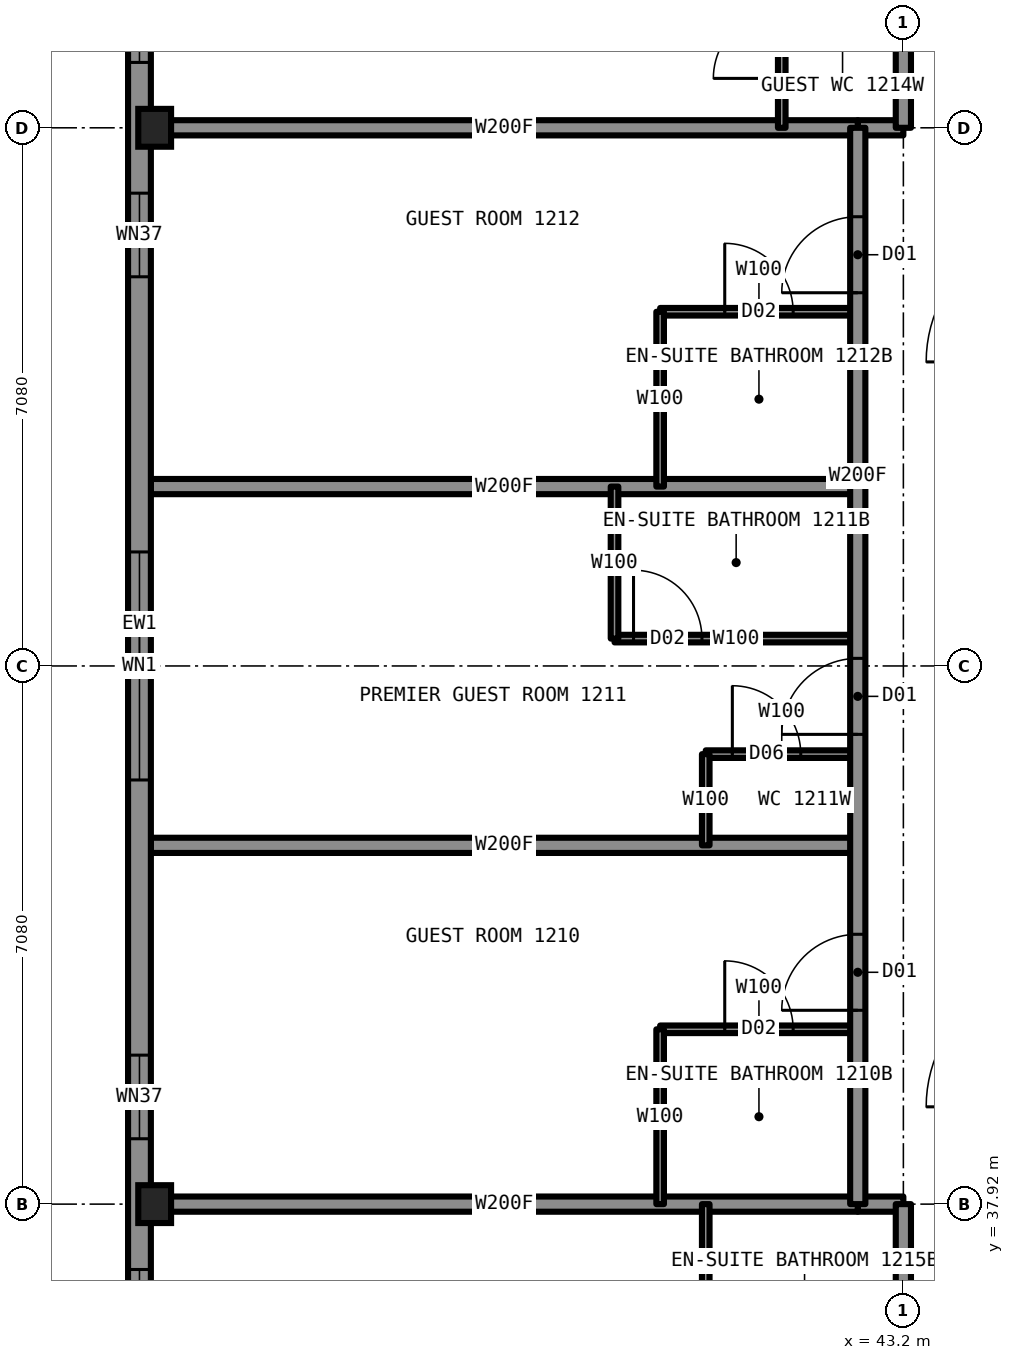
"""IFC4 building model, lengths in metres.
Left out: names, types, materials, properties, quantities, classifications, styles, units other than length and angle.
Written with IfcOpenShell. Run it as: python <this file> out.ifc"""

import sys

from ifc_helpers import new_model, si_unit, direction, frame, frame_2d, origin, origin_2d, place, context, subcontext, project, spatial, rectangle, i_section, extrude, element, fill, save


model = new_model("IFC4")
c1 = context("Model", 3, precision=1e-05, world=origin(), true_north=direction((0.0, 1.0)))
c2 = subcontext(c1, "Body", "Model", "MODEL_VIEW")
j1 = project(units=[si_unit("LENGTHUNIT", "METRE"), si_unit("PLANEANGLEUNIT", "RADIAN")], contexts=[c1])
p1 = place(None, origin())
s1 = spatial("IfcSite", under=j1, at=p1, CompositionType="ELEMENT")
p2 = place(p1, origin())
s2 = spatial("IfcBuilding", under=s1, at=p2, CompositionType="ELEMENT")
p3 = place(p2, frame((0.0, 0.0, 49.5)))
s3 = spatial("IfcBuildingStorey", under=s2, at=p3, CompositionType="ELEMENT", Elevation=49.5)
for number, where, z_axis, x_axis in (
    (1, (33.35, 37.92, 0.0), (0.0, 0.0, 1.0), (1.0, 0.0, 0.0)),
    (2, (33.35, 52.08, 0.0), (0.0, 0.0, 1.0), (1.0, 0.0, 0.0)),
):
    element("IfcColumn", number, at=place(p3, frame(where, z_axis=z_axis, x_axis=x_axis)), inside=s3, PredefinedType="COLUMN", context=c2, shape_type="SweptSolid", body=[
        extrude(i_section(OverallWidth=0.432, OverallDepth=0.498, WebThickness=0.056, FlangeThickness=0.089, at=origin_2d()), origin(), (0.0, 0.0, 1.0), 3.5),
    ])
p4 = place(p3, frame((40.6, 43.84, 0.0), z_axis=(0.0, 0.0, 1.0), x_axis=(1.0, 0.0, 0.0)))
e3 = element("IfcWall", 3, at=p4, inside=s3, PredefinedType="PARTITIONING", context=c2, shape_type="SweptSolid", body=[
    extrude(rectangle(XDim=2.0, YDim=0.1, at=frame_2d((1.0, 0.0))), origin(), (0.0, 0.0, 1.0), 3.33),
])
p5 = place(p4, frame((0.35, 0.0, 0.0)))
e4 = element("IfcOpeningElement", 4, at=p5, cuts=e3, PredefinedType="OPENING", context=c2, shape_type="SweptSolid", body=[
    extrude(rectangle(XDim=0.9, YDim=2.1, at=frame_2d((0.45, 1.05))), frame((0.0, 0.06, 0.0), z_axis=(0.0, -1.0, 0.0), x_axis=(1.0, 0.0, 0.0)), (0.0, 0.0, 1.0), 0.12),
])
p6 = place(p3, frame((33.3, 42.64, 0.0), z_axis=(0.0, 0.0, 1.0), x_axis=(1.0, 0.0, 0.0)))
e5 = element("IfcWall", 5, at=p6, inside=s3, PredefinedType="PARTITIONING", context=c2, shape_type="SweptSolid", body=[
    extrude(rectangle(XDim=9.3, YDim=0.2, at=frame_2d((4.65, 0.0))), origin(), (0.0, 0.0, 1.0), 2.723),
])
p7 = place(p3, frame((40.0, 40.22, 0.0), z_axis=(0.0, 0.0, 1.0), x_axis=(1.0, 0.0, 0.0)))
e6 = element("IfcWall", 6, at=p7, inside=s3, PredefinedType="PARTITIONING", context=c2, shape_type="SweptSolid", body=[
    extrude(rectangle(XDim=2.6, YDim=0.1, at=frame_2d((1.3, 0.0))), origin(), (0.0, 0.0, 1.0), 2.723),
])
p8 = place(p7, frame((0.85, 0.0, 0.0)))
e7 = element("IfcOpeningElement", 7, at=p8, cuts=e6, PredefinedType="OPENING", context=c2, shape_type="SweptSolid", body=[
    extrude(rectangle(XDim=0.9, YDim=2.1, at=frame_2d((0.45, 1.05))), frame((0.0, 0.06, 0.0), z_axis=(0.0, -1.0, 0.0), x_axis=(1.0, 0.0, 0.0)), (0.0, 0.0, 1.0), 0.12),
])
p9 = place(p3, frame((42.6, 37.92, 0.0), z_axis=(0.0, 0.0, 1.0), x_axis=(1.0, 0.0, 0.0)))
e8 = element("IfcWall", 8, at=p9, inside=s3, PredefinedType="PARTITIONING", context=c2, shape_type="SweptSolid", body=[
    extrude(rectangle(XDim=0.6, YDim=0.2, at=frame_2d((0.3, 0.0))), origin(), (0.0, 0.0, 1.0), 2.573),
])
p10 = place(p3, frame((33.3, 37.92, 0.0), z_axis=(0.0, 0.0, 1.0), x_axis=(1.0, 0.0, 0.0)))
e9 = element("IfcWall", 9, at=p10, inside=s3, PredefinedType="PARTITIONING", context=c2, shape_type="SweptSolid", body=[
    extrude(rectangle(XDim=9.3, YDim=0.2, at=frame_2d((4.65, 0.0))), origin(), (0.0, 0.0, 1.0), 2.573),
])
p11 = place(p3, frame((39.4, 45.36, 0.0), z_axis=(0.0, 0.0, 1.0), x_axis=(1.0, 0.0, 0.0)))
e10 = element("IfcWall", 10, at=p11, inside=s3, PredefinedType="PARTITIONING", context=c2, shape_type="SweptSolid", body=[
    extrude(rectangle(XDim=3.2, YDim=0.1, at=frame_2d((1.6, 0.0))), origin(), (0.0, 0.0, 1.0), 3.33),
])
p12 = place(p11, frame((0.25, 0.0, 0.0)))
e11 = element("IfcOpeningElement", 11, at=p12, cuts=e10, PredefinedType="OPENING", context=c2, shape_type="SweptSolid", body=[
    extrude(rectangle(XDim=0.9, YDim=2.1, at=frame_2d((0.45, 1.05))), frame((0.0, 0.06, 0.0), z_axis=(0.0, -1.0, 0.0), x_axis=(1.0, 0.0, 0.0)), (0.0, 0.0, 1.0), 0.12),
])
p13 = place(p3, frame((33.3, 47.36, 0.0), z_axis=(0.0, 0.0, 1.0), x_axis=(1.0, 0.0, 0.0)))
e12 = element("IfcWall", 12, at=p13, inside=s3, PredefinedType="PARTITIONING", context=c2, shape_type="SweptSolid", body=[
    extrude(rectangle(XDim=9.3, YDim=0.2, at=frame_2d((4.65, 0.0))), origin(), (0.0, 0.0, 1.0), 2.723),
])
p14 = place(p3, frame((40.0, 49.66, 0.0), z_axis=(0.0, 0.0, 1.0), x_axis=(1.0, 0.0, 0.0)))
e13 = element("IfcWall", 13, at=p14, inside=s3, PredefinedType="PARTITIONING", context=c2, shape_type="SweptSolid", body=[
    extrude(rectangle(XDim=2.6, YDim=0.1, at=frame_2d((1.3, 0.0))), origin(), (0.0, 0.0, 1.0), 2.723),
])
p15 = place(p14, frame((0.85, 0.0, 0.0)))
e14 = element("IfcOpeningElement", 14, at=p15, cuts=e13, PredefinedType="OPENING", context=c2, shape_type="SweptSolid", body=[
    extrude(rectangle(XDim=0.9, YDim=2.1, at=frame_2d((0.45, 1.05))), frame((0.0, 0.06, 0.0), z_axis=(0.0, -1.0, 0.0), x_axis=(1.0, 0.0, 0.0)), (0.0, 0.0, 1.0), 0.12),
])
p16 = place(p3, frame((42.6, 52.08, 0.0), z_axis=(0.0, 0.0, 1.0), x_axis=(1.0, 0.0, 0.0)))
e15 = element("IfcWall", 15, at=p16, inside=s3, PredefinedType="PARTITIONING", context=c2, shape_type="SweptSolid", body=[
    extrude(rectangle(XDim=0.6, YDim=0.2, at=frame_2d((0.3, 0.0))), origin(), (0.0, 0.0, 1.0), 2.573),
])
p17 = place(p3, frame((33.3, 52.08, 0.0), z_axis=(0.0, 0.0, 1.0), x_axis=(1.0, 0.0, 0.0)))
e16 = element("IfcWall", 16, at=p17, inside=s3, PredefinedType="PARTITIONING", context=c2, shape_type="SweptSolid", body=[
    extrude(rectangle(XDim=9.3, YDim=0.2, at=frame_2d((4.65, 0.0))), origin(), (0.0, 0.0, 1.0), 2.573),
])
p18 = place(p3, frame((43.2, 33.2, 0.0), z_axis=(0.0, 0.0, 1.0), x_axis=(0.0, 1.0, 0.0)))
e17 = element("IfcWall", 17, at=p18, inside=s3, PredefinedType="PARTITIONING", context=c2, shape_type="SweptSolid", body=[
    extrude(rectangle(XDim=4.72, YDim=0.2, at=frame_2d((2.36, 0.0))), origin(), (0.0, 0.0, 1.0), 3.33),
])
p19 = place(p18, frame((0.66, 0.0, 0.0)))
e18 = element("IfcOpeningElement", 18, at=p19, cuts=e17, PredefinedType="OPENING", context=c2, shape_type="SweptSolid", body=[
    extrude(rectangle(XDim=1.1, YDim=2.2, at=frame_2d((0.55, 1.1))), frame((0.0, 0.11, 0.0), z_axis=(0.0, -1.0, 0.0), x_axis=(1.0, 0.0, 0.0)), (0.0, 0.0, 1.0), 0.22),
])
p20 = place(p3, frame((43.2, 52.08, 0.0), z_axis=(0.0, 0.0, 1.0), x_axis=(0.0, 1.0, 0.0)))
e19 = element("IfcWall", 19, at=p20, inside=s3, PredefinedType="PARTITIONING", context=c2, shape_type="SweptSolid", body=[
    extrude(rectangle(XDim=4.72, YDim=0.2, at=frame_2d((2.36, 0.0))), origin(), (0.0, 0.0, 1.0), 3.33),
])
p21 = place(p20, frame((2.97, 0.0, 0.0)))
e20 = element("IfcOpeningElement", 20, at=p21, cuts=e19, PredefinedType="OPENING", context=c2, shape_type="SweptSolid", body=[
    extrude(rectangle(XDim=1.1, YDim=2.2, at=frame_2d((0.55, 1.1))), frame((0.0, 0.11, 0.0), z_axis=(0.0, -1.0, 0.0), x_axis=(1.0, 0.0, 0.0)), (0.0, 0.0, 1.0), 0.22),
])
p22 = place(p3, frame((42.6, 37.92, 0.0), z_axis=(0.0, 0.0, 1.0), x_axis=(0.0, 1.0, 0.0)))
e21 = element("IfcWall", 21, at=p22, inside=s3, PredefinedType="PARTITIONING", context=c2, shape_type="SweptSolid", body=[
    extrude(rectangle(XDim=14.16, YDim=0.2, at=frame_2d((7.08, 0.0))), origin(), (0.0, 0.0, 1.0), 3.33),
])
p23 = place(p22, frame((2.55, 0.0, 0.0)))
e22 = element("IfcOpeningElement", 22, at=p23, cuts=e21, PredefinedType="OPENING", context=c2, shape_type="SweptSolid", body=[
    extrude(rectangle(XDim=1.0, YDim=2.2, at=frame_2d((0.5, 1.1))), frame((0.0, 0.11, 0.0), z_axis=(0.0, -1.0, 0.0), x_axis=(1.0, 0.0, 0.0)), (0.0, 0.0, 1.0), 0.22),
])
p24 = place(p22, frame((6.18, 0.0, 0.0)))
e23 = element("IfcOpeningElement", 23, at=p24, cuts=e21, PredefinedType="OPENING", context=c2, shape_type="SweptSolid", body=[
    extrude(rectangle(XDim=1.0, YDim=2.2, at=frame_2d((0.5, 1.1))), frame((0.0, 0.11, 0.0), z_axis=(0.0, -1.0, 0.0), x_axis=(1.0, 0.0, 0.0)), (0.0, 0.0, 1.0), 0.22),
])
p25 = place(p22, frame((11.99, 0.0, 0.0)))
e24 = element("IfcOpeningElement", 24, at=p25, cuts=e21, PredefinedType="OPENING", context=c2, shape_type="SweptSolid", body=[
    extrude(rectangle(XDim=1.0, YDim=2.2, at=frame_2d((0.5, 1.1))), frame((0.0, 0.11, 0.0), z_axis=(0.0, -1.0, 0.0), x_axis=(1.0, 0.0, 0.0)), (0.0, 0.0, 1.0), 0.22),
])
p26 = place(p3, frame((41.6, 52.08, 0.0), z_axis=(0.0, 0.0, 1.0), x_axis=(0.0, 1.0, 0.0)))
e25 = element("IfcWall", 25, at=p26, inside=s3, PredefinedType="PARTITIONING", context=c2, shape_type="SweptSolid", body=[
    extrude(rectangle(XDim=2.2, YDim=0.1, at=frame_2d((1.1, 0.0))), origin(), (0.0, 0.0, 1.0), 3.33),
])
p27 = place(p26, frame((0.65, 0.0, 0.0)))
e26 = element("IfcOpeningElement", 26, at=p27, cuts=e25, PredefinedType="OPENING", context=c2, shape_type="SweptSolid", body=[
    extrude(rectangle(XDim=0.9, YDim=2.1, at=frame_2d((0.45, 1.05))), frame((0.0, 0.06, 0.0), z_axis=(0.0, -1.0, 0.0), x_axis=(1.0, 0.0, 0.0)), (0.0, 0.0, 1.0), 0.12),
])
p28 = place(p3, frame((40.6, 35.32, 0.0), z_axis=(0.0, 0.0, 1.0), x_axis=(0.0, 1.0, 0.0)))
e27 = element("IfcWall", 27, at=p28, inside=s3, PredefinedType="PARTITIONING", context=c2, shape_type="SweptSolid", body=[
    extrude(rectangle(XDim=2.6, YDim=0.1, at=frame_2d((1.3, 0.0))), origin(), (0.0, 0.0, 1.0), 3.33),
])
p29 = place(p3, frame((40.6, 42.64, 0.0), z_axis=(0.0, 0.0, 1.0), x_axis=(0.0, 1.0, 0.0)))
e28 = element("IfcWall", 28, at=p29, inside=s3, PredefinedType="PARTITIONING", context=c2, shape_type="SweptSolid", body=[
    extrude(rectangle(XDim=1.2, YDim=0.1, at=frame_2d((0.6, 0.0))), origin(), (0.0, 0.0, 1.0), 3.33),
])
p30 = place(p3, frame((40.0, 37.92, 0.0), z_axis=(0.0, 0.0, 1.0), x_axis=(0.0, 1.0, 0.0)))
e29 = element("IfcWall", 29, at=p30, inside=s3, PredefinedType="PARTITIONING", context=c2, shape_type="SweptSolid", body=[
    extrude(rectangle(XDim=2.3, YDim=0.1, at=frame_2d((1.15, 0.0))), origin(), (0.0, 0.0, 1.0), 3.33),
])
p31 = place(p3, frame((40.0, 47.36, 0.0), z_axis=(0.0, 0.0, 1.0), x_axis=(0.0, 1.0, 0.0)))
e30 = element("IfcWall", 30, at=p31, inside=s3, PredefinedType="PARTITIONING", context=c2, shape_type="SweptSolid", body=[
    extrude(rectangle(XDim=2.3, YDim=0.1, at=frame_2d((1.15, 0.0))), origin(), (0.0, 0.0, 1.0), 3.33),
])
p32 = place(p3, frame((39.4, 45.36, 0.0), z_axis=(0.0, 0.0, 1.0), x_axis=(0.0, 1.0, 0.0)))
e31 = element("IfcWall", 31, at=p32, inside=s3, PredefinedType="PARTITIONING", context=c2, shape_type="SweptSolid", body=[
    extrude(rectangle(XDim=2.0, YDim=0.1, at=frame_2d((1.0, 0.0))), origin(), (0.0, 0.0, 1.0), 3.33),
])
p33 = place(p3, frame((33.15, 61.5, 0.0), z_axis=(0.0, 0.0, 1.0), x_axis=(0.0, -1.0, 0.0)))
e32 = element("IfcWall", 32, at=p33, inside=s3, PredefinedType="SOLIDWALL", context=c2, shape_type="SweptSolid", body=[
    extrude(rectangle(XDim=33.0, YDim=0.3, at=frame_2d((16.5, 0.0))), origin(), (0.0, 0.0, 1.0), 2.83),
])
p34 = place(p33, frame((0.85, 0.0, 0.5)))
e33 = element("IfcOpeningElement", 33, at=p34, cuts=e32, PredefinedType="OPENING", context=c2, shape_type="SweptSolid", body=[
    extrude(rectangle(XDim=3.0, YDim=2.0, at=frame_2d((1.5, 1.0))), frame((0.0, 0.16, 0.0), z_axis=(0.0, -1.0, 0.0), x_axis=(1.0, 0.0, 0.0)), (0.0, 0.0, 1.0), 0.32),
])
p35 = place(p33, frame((5.56, 0.0, 0.5)))
e34 = element("IfcOpeningElement", 34, at=p35, cuts=e32, PredefinedType="OPENING", context=c2, shape_type="SweptSolid", body=[
    extrude(rectangle(XDim=3.0, YDim=2.0, at=frame_2d((1.5, 1.0))), frame((0.0, 0.16, 0.0), z_axis=(0.0, -1.0, 0.0), x_axis=(1.0, 0.0, 0.0)), (0.0, 0.0, 1.0), 0.32),
])
p36 = place(p33, frame((10.28, 0.0, 1.1)))
e35 = element("IfcOpeningElement", 35, at=p36, cuts=e32, PredefinedType="OPENING", context=c2, shape_type="SweptSolid", body=[
    extrude(rectangle(XDim=1.1, YDim=1.4, at=frame_2d((0.55, 0.7))), frame((0.0, 0.16, 0.0), z_axis=(0.0, -1.0, 0.0), x_axis=(1.0, 0.0, 0.0)), (0.0, 0.0, 1.0), 0.32),
])
p37 = place(p33, frame((15.0, 0.0, 0.5)))
e36 = element("IfcOpeningElement", 36, at=p37, cuts=e32, PredefinedType="OPENING", context=c2, shape_type="SweptSolid", body=[
    extrude(rectangle(XDim=3.0, YDim=2.0, at=frame_2d((1.5, 1.0))), frame((0.0, 0.16, 0.0), z_axis=(0.0, -1.0, 0.0), x_axis=(1.0, 0.0, 0.0)), (0.0, 0.0, 1.0), 0.32),
])
p38 = place(p33, frame((21.62, 0.0, 1.1)))
e37 = element("IfcOpeningElement", 37, at=p38, cuts=e32, PredefinedType="OPENING", context=c2, shape_type="SweptSolid", body=[
    extrude(rectangle(XDim=1.1, YDim=1.4, at=frame_2d((0.55, 0.7))), frame((0.0, 0.16, 0.0), z_axis=(0.0, -1.0, 0.0), x_axis=(1.0, 0.0, 0.0)), (0.0, 0.0, 1.0), 0.32),
])
p39 = place(p33, frame((24.44, 0.0, 0.5)))
e38 = element("IfcOpeningElement", 38, at=p39, cuts=e32, PredefinedType="OPENING", context=c2, shape_type="SweptSolid", body=[
    extrude(rectangle(XDim=3.0, YDim=2.0, at=frame_2d((1.5, 1.0))), frame((0.0, 0.16, 0.0), z_axis=(0.0, -1.0, 0.0), x_axis=(1.0, 0.0, 0.0)), (0.0, 0.0, 1.0), 0.32),
])
p40 = place(p33, frame((29.15, 0.0, 0.5)))
e39 = element("IfcOpeningElement", 39, at=p40, cuts=e32, PredefinedType="OPENING", context=c2, shape_type="SweptSolid", body=[
    extrude(rectangle(XDim=3.0, YDim=2.0, at=frame_2d((1.5, 1.0))), frame((0.0, 0.16, 0.0), z_axis=(0.0, -1.0, 0.0), x_axis=(1.0, 0.0, 0.0)), (0.0, 0.0, 1.0), 0.32),
])
p41 = place(p23, origin())
e40 = element("IfcDoor", 40, at=p41, inside=s3, OperationType="SINGLE_SWING_LEFT", PredefinedType="DOOR", context=c2, shape_type="SweptSolid", body=[
    extrude(rectangle(XDim=1.0, YDim=2.2, at=frame_2d((0.5, 1.1))), frame((0.0, 0.025, 0.0), z_axis=(0.0, -1.0, 0.0), x_axis=(1.0, 0.0, 0.0)), (0.0, 0.0, 1.0), 0.05),
])
fill(e22, e40)
p42 = place(p8, origin())
e41 = element("IfcDoor", 41, at=p42, inside=s3, OperationType="SINGLE_SWING_RIGHT", PredefinedType="DOOR", context=c2, shape_type="SweptSolid", body=[
    extrude(rectangle(XDim=0.9, YDim=2.1, at=frame_2d((0.45, 1.05))), frame((0.0, 0.025, 0.0), z_axis=(0.0, -1.0, 0.0), x_axis=(1.0, 0.0, 0.0)), (0.0, 0.0, 1.0), 0.05),
])
fill(e7, e41)
p43 = place(p24, origin())
e42 = element("IfcDoor", 42, at=p43, inside=s3, OperationType="SINGLE_SWING_LEFT", PredefinedType="DOOR", context=c2, shape_type="SweptSolid", body=[
    extrude(rectangle(XDim=1.0, YDim=2.2, at=frame_2d((0.5, 1.1))), frame((0.0, 0.025, 0.0), z_axis=(0.0, -1.0, 0.0), x_axis=(1.0, 0.0, 0.0)), (0.0, 0.0, 1.0), 0.05),
])
fill(e23, e42)
p44 = place(p12, origin())
e43 = element("IfcDoor", 43, at=p44, inside=s3, OperationType="SINGLE_SWING_RIGHT", PredefinedType="DOOR", context=c2, shape_type="SweptSolid", body=[
    extrude(rectangle(XDim=0.9, YDim=2.1, at=frame_2d((0.45, 1.05))), frame((0.0, 0.025, 0.0), z_axis=(0.0, -1.0, 0.0), x_axis=(1.0, 0.0, 0.0)), (0.0, 0.0, 1.0), 0.05),
])
fill(e11, e43)
p45 = place(p5, origin())
e44 = element("IfcDoor", 44, at=p45, inside=s3, OperationType="SINGLE_SWING_LEFT", PredefinedType="DOOR", context=c2, shape_type="SweptSolid", body=[
    extrude(rectangle(XDim=0.9, YDim=2.1, at=frame_2d((0.45, 1.05))), frame((0.0, 0.025, 0.0), z_axis=(0.0, -1.0, 0.0), x_axis=(1.0, 0.0, 0.0)), (0.0, 0.0, 1.0), 0.05),
])
fill(e4, e44)
p46 = place(p25, origin())
e45 = element("IfcDoor", 45, at=p46, inside=s3, OperationType="SINGLE_SWING_LEFT", PredefinedType="DOOR", context=c2, shape_type="SweptSolid", body=[
    extrude(rectangle(XDim=1.0, YDim=2.2, at=frame_2d((0.5, 1.1))), frame((0.0, 0.025, 0.0), z_axis=(0.0, -1.0, 0.0), x_axis=(1.0, 0.0, 0.0)), (0.0, 0.0, 1.0), 0.05),
])
fill(e24, e45)
p47 = place(p15, origin())
e46 = element("IfcDoor", 46, at=p47, inside=s3, OperationType="SINGLE_SWING_RIGHT", PredefinedType="DOOR", context=c2, shape_type="SweptSolid", body=[
    extrude(rectangle(XDim=0.9, YDim=2.1, at=frame_2d((0.45, 1.05))), frame((0.0, 0.025, 0.0), z_axis=(0.0, -1.0, 0.0), x_axis=(1.0, 0.0, 0.0)), (0.0, 0.0, 1.0), 0.05),
])
fill(e14, e46)
p48 = place(p27, origin())
e47 = element("IfcDoor", 47, at=p48, inside=s3, OperationType="SINGLE_SWING_LEFT", PredefinedType="DOOR", context=c2, shape_type="SweptSolid", body=[
    extrude(rectangle(XDim=0.9, YDim=2.1, at=frame_2d((0.45, 1.05))), frame((0.0, 0.025, 0.0), z_axis=(0.0, -1.0, 0.0), x_axis=(1.0, 0.0, 0.0)), (0.0, 0.0, 1.0), 0.05),
])
fill(e26, e47)
p49 = place(p35, origin())
e48 = element("IfcWindow", 48, at=p49, inside=s3, PartitioningType="SINGLE_PANEL", PredefinedType="WINDOW", context=c2, shape_type="SweptSolid", body=[
    extrude(rectangle(XDim=3.0, YDim=2.0, at=frame_2d((1.5, 1.0))), frame((0.0, 0.03, 0.0), z_axis=(0.0, -1.0, 0.0), x_axis=(1.0, 0.0, 0.0)), (0.0, 0.0, 1.0), 0.06),
])
fill(e34, e48)
p50 = place(p36, origin())
e49 = element("IfcWindow", 49, at=p50, inside=s3, PartitioningType="SINGLE_PANEL", PredefinedType="WINDOW", context=c2, shape_type="SweptSolid", body=[
    extrude(rectangle(XDim=1.1, YDim=1.4, at=frame_2d((0.55, 0.7))), frame((0.0, 0.03, 0.0), z_axis=(0.0, -1.0, 0.0), x_axis=(1.0, 0.0, 0.0)), (0.0, 0.0, 1.0), 0.06),
])
fill(e35, e49)
p51 = place(p37, origin())
e50 = element("IfcWindow", 50, at=p51, inside=s3, PartitioningType="SINGLE_PANEL", PredefinedType="WINDOW", context=c2, shape_type="SweptSolid", body=[
    extrude(rectangle(XDim=3.0, YDim=2.0, at=frame_2d((1.5, 1.0))), frame((0.0, 0.03, 0.0), z_axis=(0.0, -1.0, 0.0), x_axis=(1.0, 0.0, 0.0)), (0.0, 0.0, 1.0), 0.06),
])
fill(e36, e50)
p52 = place(p38, origin())
e51 = element("IfcWindow", 51, at=p52, inside=s3, PartitioningType="SINGLE_PANEL", PredefinedType="WINDOW", context=c2, shape_type="SweptSolid", body=[
    extrude(rectangle(XDim=1.1, YDim=1.4, at=frame_2d((0.55, 0.7))), frame((0.0, 0.03, 0.0), z_axis=(0.0, -1.0, 0.0), x_axis=(1.0, 0.0, 0.0)), (0.0, 0.0, 1.0), 0.06),
])
fill(e37, e51)
p53 = place(p39, origin())
e52 = element("IfcWindow", 52, at=p53, inside=s3, PartitioningType="SINGLE_PANEL", PredefinedType="WINDOW", context=c2, shape_type="SweptSolid", body=[
    extrude(rectangle(XDim=3.0, YDim=2.0, at=frame_2d((1.5, 1.0))), frame((0.0, 0.03, 0.0), z_axis=(0.0, -1.0, 0.0), x_axis=(1.0, 0.0, 0.0)), (0.0, 0.0, 1.0), 0.06),
])
fill(e38, e52)
save(model, sys.argv[1])
